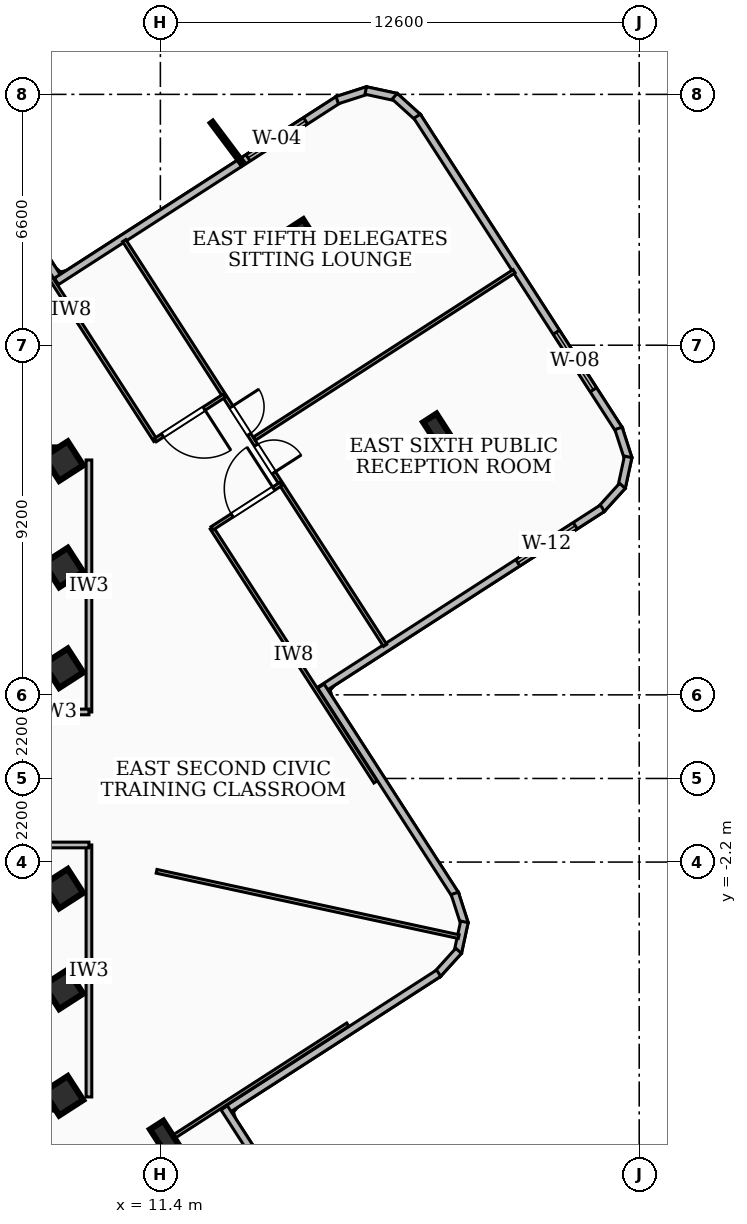
"""IFC4 building model, lengths in metres.
Left out: names, types, materials, properties, quantities, classifications, styles, units other than length and angle.
Written with IfcOpenShell. Run it as: python <this file> out.ifc"""

import sys

from ifc_helpers import new_model, si_unit, direction, frame, frame_2d, origin, origin_2d, place, context, subcontext, project, spatial, rectangle, i_section, extrude, element, fill, save


model = new_model("IFC4")
c1 = context("Model", 3, precision=1e-05, world=origin(), true_north=direction((0.0, 1.0)))
c2 = subcontext(c1, "Body", "Model", "MODEL_VIEW")
j1 = project(units=[si_unit("LENGTHUNIT", "METRE"), si_unit("PLANEANGLEUNIT", "RADIAN")], contexts=[c1])
p1 = place(None, origin())
s1 = spatial("IfcSite", under=j1, at=p1, CompositionType="ELEMENT")
p2 = place(p1, origin())
s2 = spatial("IfcBuilding", under=s1, at=p2, CompositionType="ELEMENT")
p3 = place(p2, frame((0.0, 0.0, 215.46)))
s3 = spatial("IfcBuildingStorey", under=s2, at=p3, CompositionType="ELEMENT", Elevation=215.46)
for number, where, z_axis, x_axis in (
    (1, (-8.78, 8.51, 0.0), (0.0, 0.0, 1.0), (1.0, 0.0, 0.0)),
    (2, (8.78, -8.51, 0.0), (0.0, 0.0, 1.0), (-1.0, 0.0, 0.0)),
):
    element("IfcWall", number, at=place(p3, frame(where, z_axis=z_axis, x_axis=x_axis)), inside=s3, PredefinedType="SHEAR", context=c2, shape_type="SweptSolid", body=[
        extrude(rectangle(XDim=17.56, YDim=0.4, at=frame_2d((8.78, 0.0))), origin(), (0.0, 0.0, 1.0), 3.16),
    ])
for number, where, z_axis, x_axis in (
    (3, (8.85, -5.55, 0.0), (0.0, 0.0, 1.0), (0.841, 0.542, 0.0)),
    (4, (8.85, -2.9, 0.0), (0.0, 0.0, 1.0), (0.841, 0.542, 0.0)),
    (5, (8.85, 2.9, 0.0), (0.0, 0.0, 1.0), (0.841, 0.542, 0.0)),
    (6, (8.85, 5.55, 0.0), (0.0, 0.0, 1.0), (0.841, 0.542, 0.0)),
    (7, (8.85, -8.35, 0.0), (0.0, 0.0, 1.0), (0.841, 0.542, 0.0)),
    (8, (8.85, 8.35, 0.0), (0.0, 0.0, 1.0), (0.841, 0.542, 0.0)),
):
    element("IfcColumn", number, at=place(p3, frame(where, z_axis=z_axis, x_axis=x_axis)), inside=s3, PredefinedType="COLUMN", context=c2, shape_type="SweptSolid", body=[
        extrude(rectangle(XDim=0.75, YDim=0.75, at=origin_2d()), origin(), (0.0, 0.0, 1.0), 3.42),
    ])
for number, where, z_axis, x_axis in (
    (9, (18.741, 9.097, 0.0), (0.0, 0.0, 1.0), (0.841, 0.542, 0.0)),
    (10, (15.234, 14.209, 0.0), (0.0, 0.0, 1.0), (0.841, 0.542, 0.0)),
    (11, (11.554, -9.51, 0.0), (0.0, 0.0, 1.0), (0.841, 0.542, 0.0)),
):
    element("IfcColumn", number, at=place(p3, frame(where, z_axis=z_axis, x_axis=x_axis)), inside=s3, PredefinedType="COLUMN", context=c2, shape_type="SweptSolid", body=[
        extrude(i_section(OverallWidth=0.418, OverallDepth=0.927, WebThickness=0.019, FlangeThickness=0.032, at=origin_2d()), origin(), (0.0, 0.0, 1.0), 3.42),
    ])
p4 = place(p3, frame((5.124, 18.723, 0.0), z_axis=(0.0, 0.0, 1.0), x_axis=(0.541679726821, -0.840584959151, 0.0)))
e12 = element("IfcWall", 12, at=p4, inside=s3, PredefinedType="SOLIDWALL", context=c2, shape_type="SweptSolid", body=[
    extrude(rectangle(XDim=6.742, YDim=0.2, at=frame_2d((3.371, 0.0))), origin(), (0.0, 0.0, 1.0), 3.16),
])
p5 = place(p3, frame((8.666, 13.08, 0.0), z_axis=(0.0, 0.0, 1.0), x_axis=(0.840540020681, 0.541749456515, 0.0)))
e13 = element("IfcWall", 13, at=p5, inside=s3, PredefinedType="SOLIDWALL", context=c2, shape_type="SweptSolid", body=[
    extrude(rectangle(XDim=8.842, YDim=0.2, at=frame_2d((4.421, 0.0))), origin(), (0.0, 0.0, 1.0), 3.16),
])
p6 = place(p5, frame((5.997, 0.0, 0.85)))
e14 = element("IfcOpeningElement", 14, at=p6, cuts=e13, PredefinedType="OPENING", context=c2, shape_type="SweptSolid", body=[
    extrude(rectangle(XDim=1.8, YDim=2.0, at=frame_2d((0.9, 1.0))), frame((0.0, 0.11, 0.0), z_axis=(0.0, -1.0, 0.0), x_axis=(1.0, 0.0, 0.0)), (0.0, 0.0, 1.0), 0.22),
])
p7 = place(p3, frame((16.053, 17.848, 0.0), z_axis=(0.0, 0.0, 1.0), x_axis=(0.951946820804, 0.306263367646, 0.0)))
e15 = element("IfcWall", 15, at=p7, inside=s3, PredefinedType="SOLIDWALL", context=c2, shape_type="SweptSolid", body=[
    extrude(rectangle(XDim=0.839, YDim=0.2, at=frame_2d((0.42, 0.0))), origin(), (0.0, 0.0, 1.0), 3.16),
])
p8 = place(p3, frame((16.804, 18.102, 0.0), z_axis=(0.0, 0.0, 1.0), x_axis=(0.977405889656, -0.211371064399, 0.0)))
e16 = element("IfcWall", 16, at=p8, inside=s3, PredefinedType="SOLIDWALL", context=c2, shape_type="SweptSolid", body=[
    extrude(rectangle(XDim=0.823, YDim=0.2, at=frame_2d((0.412, 0.0))), origin(), (0.0, 0.0, 1.0), 3.16),
])
p9 = place(p3, frame((17.566, 17.95, 0.0), z_axis=(0.0, 0.0, 1.0), x_axis=(0.741439258983, -0.671019988703, 0.0)))
e17 = element("IfcWall", 17, at=p9, inside=s3, PredefinedType="SOLIDWALL", context=c2, shape_type="SweptSolid", body=[
    extrude(rectangle(XDim=0.839, YDim=0.2, at=frame_2d((0.419, 0.0))), origin(), (0.0, 0.0, 1.0), 3.16),
])
p10 = place(p3, frame((18.155, 17.425, 0.0), z_axis=(0.0, 0.0, 1.0), x_axis=(0.541713039183, -0.840563491462, 0.0)))
e18 = element("IfcWall", 18, at=p10, inside=s3, PredefinedType="SOLIDWALL", context=c2, shape_type="SweptSolid", body=[
    extrude(rectangle(XDim=9.824, YDim=0.2, at=frame_2d((4.912, 0.0))), origin(), (0.0, 0.0, 1.0), 3.16),
])
p11 = place(p10, frame((6.763, 0.0, 0.85)))
e19 = element("IfcOpeningElement", 19, at=p11, cuts=e18, PredefinedType="OPENING", context=c2, shape_type="SweptSolid", body=[
    extrude(rectangle(XDim=1.8, YDim=1.8, at=frame_2d((0.9, 0.9))), frame((0.0, 0.11, 0.0), z_axis=(0.0, -1.0, 0.0), x_axis=(1.0, 0.0, 0.0)), (0.0, 0.0, 1.0), 0.22),
])
p12 = place(p3, frame((23.455, 9.212, 0.0), z_axis=(0.0, 0.0, 1.0), x_axis=(0.306424011446, -0.951895123009, 0.0)))
e20 = element("IfcWall", 20, at=p12, inside=s3, PredefinedType="SOLIDWALL", context=c2, shape_type="SweptSolid", body=[
    extrude(rectangle(XDim=0.838, YDim=0.2, at=frame_2d((0.419, 0.0))), origin(), (0.0, 0.0, 1.0), 3.16),
])
p13 = place(p3, frame((23.709, 8.462, 0.0), z_axis=(0.0, 0.0, 1.0), x_axis=(-0.210237806088, -0.977650277395, 0.0)))
e21 = element("IfcWall", 21, at=p13, inside=s3, PredefinedType="SOLIDWALL", context=c2, shape_type="SweptSolid", body=[
    extrude(rectangle(XDim=0.823, YDim=0.2, at=frame_2d((0.412, 0.0))), origin(), (0.0, 0.0, 1.0), 3.16),
])
p14 = place(p3, frame((23.558, 7.7, 0.0), z_axis=(0.0, 0.0, 1.0), x_axis=(-0.671818647766, -0.740715670493, 0.0)))
e22 = element("IfcWall", 22, at=p14, inside=s3, PredefinedType="SOLIDWALL", context=c2, shape_type="SweptSolid", body=[
    extrude(rectangle(XDim=0.84, YDim=0.2, at=frame_2d((0.42, 0.0))), origin(), (0.0, 0.0, 1.0), 3.16),
])
p15 = place(p3, frame((23.032, 7.111, 0.0), z_axis=(0.0, 0.0, 1.0), x_axis=(-0.840540020681, -0.541749456515, 0.0)))
e23 = element("IfcWall", 23, at=p15, inside=s3, PredefinedType="SOLIDWALL", context=c2, shape_type="SweptSolid", body=[
    extrude(rectangle(XDim=8.842, YDim=0.2, at=frame_2d((4.421, 0.0))), origin(), (0.0, 0.0, 1.0), 3.16),
])
p16 = place(p15, frame((0.85, 0.0, 0.85)))
e24 = element("IfcOpeningElement", 24, at=p16, cuts=e23, PredefinedType="OPENING", context=c2, shape_type="SweptSolid", body=[
    extrude(rectangle(XDim=1.8, YDim=1.6, at=frame_2d((0.9, 0.8))), frame((0.0, 0.11, 0.0), z_axis=(0.0, -1.0, 0.0), x_axis=(1.0, 0.0, 0.0)), (0.0, 0.0, 1.0), 0.22),
])
p17 = place(p3, frame((15.624, 2.431, 0.0), z_axis=(0.0, 0.0, 1.0), x_axis=(0.541715396451, -0.840561972283, 0.0)))
e25 = element("IfcWall", 25, at=p17, inside=s3, PredefinedType="SOLIDWALL", context=c2, shape_type="SweptSolid", body=[
    extrude(rectangle(XDim=6.542, YDim=0.2, at=frame_2d((3.271, 0.0))), origin(), (0.0, 0.0, 1.0), 3.16),
])
p18 = place(p3, frame((19.146, -3.023, 0.0), z_axis=(0.0, 0.0, 1.0), x_axis=(0.306602907463, -0.951837516142, 0.0)))
e26 = element("IfcWall", 26, at=p18, inside=s3, PredefinedType="SOLIDWALL", context=c2, shape_type="SweptSolid", body=[
    extrude(rectangle(XDim=0.838, YDim=0.2, at=frame_2d((0.419, 0.0))), origin(), (0.0, 0.0, 1.0), 3.16),
])
p19 = place(p3, frame((19.4, -3.773, 0.0), z_axis=(0.0, 0.0, 1.0), x_axis=(-0.211087829535, -0.977467098281, 0.0)))
e27 = element("IfcWall", 27, at=p19, inside=s3, PredefinedType="SOLIDWALL", context=c2, shape_type="SweptSolid", body=[
    extrude(rectangle(XDim=0.823, YDim=0.2, at=frame_2d((0.412, 0.0))), origin(), (0.0, 0.0, 1.0), 3.16),
])
p20 = place(p3, frame((19.248, -4.535, 0.0), z_axis=(0.0, 0.0, 1.0), x_axis=(-0.671019988703, -0.741439258983, 0.0)))
e28 = element("IfcWall", 28, at=p20, inside=s3, PredefinedType="SOLIDWALL", context=c2, shape_type="SweptSolid", body=[
    extrude(rectangle(XDim=0.839, YDim=0.2, at=frame_2d((0.419, 0.0))), origin(), (0.0, 0.0, 1.0), 3.16),
])
p21 = place(p3, frame((18.723, -5.124, 0.0), z_axis=(0.0, 0.0, 1.0), x_axis=(-0.840584959151, -0.541679726821, 0.0)))
e29 = element("IfcWall", 29, at=p21, inside=s3, PredefinedType="SOLIDWALL", context=c2, shape_type="SweptSolid", body=[
    extrude(rectangle(XDim=6.742, YDim=0.2, at=frame_2d((3.371, 0.0))), origin(), (0.0, 0.0, 1.0), 3.16),
])
p22 = place(p3, frame((13.08, -8.666, 0.0), z_axis=(0.0, 0.0, 1.0), x_axis=(0.541732711374, -0.840550813114, 0.0)))
e30 = element("IfcWall", 30, at=p22, inside=s3, PredefinedType="SOLIDWALL", context=c2, shape_type="SweptSolid", body=[
    extrude(rectangle(XDim=4.642, YDim=0.2, at=frame_2d((2.321, 0.0))), origin(), (0.0, 0.0, 1.0), 3.16),
])
p23 = place(p3, frame((9.52, 1.75, 0.0), z_axis=(0.0, 0.0, 1.0), x_axis=(0.0, 1.0, 0.0)))
e31 = element("IfcWall", 31, at=p23, inside=s3, PredefinedType="PARTITIONING", context=c2, shape_type="SweptSolid", body=[
    extrude(rectangle(XDim=6.63, YDim=0.15, at=frame_2d((3.315, 0.0))), origin(), (0.0, 0.0, 1.0), 2.53),
])
p24 = place(p3, frame((7.85, 1.75, 0.0), z_axis=(0.0, 0.0, 1.0), x_axis=(1.0, 0.0, 0.0)))
e32 = element("IfcWall", 32, at=p24, inside=s3, PredefinedType="PARTITIONING", context=c2, shape_type="SweptSolid", body=[
    extrude(rectangle(XDim=1.67, YDim=0.15, at=frame_2d((0.835, 0.0))), origin(), (0.0, 0.0, 1.0), 2.39),
])
p25 = place(p3, frame((9.52, -8.38, 0.0), z_axis=(0.0, 0.0, 1.0), x_axis=(0.0, 1.0, 0.0)))
e33 = element("IfcWall", 33, at=p25, inside=s3, PredefinedType="PARTITIONING", context=c2, shape_type="SweptSolid", body=[
    extrude(rectangle(XDim=6.63, YDim=0.15, at=frame_2d((3.315, 0.0))), origin(), (0.0, 0.0, 1.0), 3.16),
])
p26 = place(p3, frame((7.85, -1.75, 0.0), z_axis=(0.0, 0.0, 1.0), x_axis=(1.0, 0.0, 0.0)))
e34 = element("IfcWall", 34, at=p26, inside=s3, PredefinedType="PARTITIONING", context=c2, shape_type="SweptSolid", body=[
    extrude(rectangle(XDim=1.67, YDim=0.15, at=frame_2d((0.835, 0.0))), origin(), (0.0, 0.0, 1.0), 2.39),
])
p27 = place(p3, frame((11.3, -2.443, 0.0), z_axis=(0.0, 0.0, 1.0), x_axis=(0.977411986974, -0.211342867681, 0.0)))
e35 = element("IfcWall", 35, at=p27, inside=s3, PredefinedType="PARTITIONING", context=c2, shape_type="SweptSolid", body=[
    extrude(rectangle(XDim=8.134, YDim=0.1, at=frame_2d((4.067, 0.0))), origin(), (0.0, 0.0, 1.0), 3.16),
])
p28 = place(p3, frame((11.27, 8.893, 0.0), z_axis=(0.0, 0.0, 1.0), x_axis=(-0.541761070726, 0.840532534912, 0.0)))
e36 = element("IfcWall", 36, at=p28, inside=s3, PredefinedType="PARTITIONING", context=c2, shape_type="SweptSolid", body=[
    extrude(rectangle(XDim=8.149, YDim=0.1, at=frame_2d((4.075, 0.0))), origin(), (0.0, 0.0, 1.0), 2.53),
])
p29 = place(p3, frame((17.06, -0.093, 0.0), z_axis=(0.0, 0.0, 1.0), x_axis=(-0.541691689426, 0.840577250232, 0.0)))
e37 = element("IfcWall", 37, at=p29, inside=s3, PredefinedType="PARTITIONING", context=c2, shape_type="SweptSolid", body=[
    extrude(rectangle(XDim=7.949, YDim=0.1, at=frame_2d((3.975, 0.0))), origin(), (0.0, 0.0, 1.0), 3.16),
])
p30 = place(p3, frame((13.08, 10.071, 0.0), z_axis=(0.0, 0.0, 1.0), x_axis=(-0.840623628822, -0.541619714067, 0.0)))
e38 = element("IfcWall", 38, at=p30, inside=s3, PredefinedType="PARTITIONING", context=c2, shape_type="SweptSolid", body=[
    extrude(rectangle(XDim=2.16, YDim=0.1, at=frame_2d((1.08, 0.0))), origin(), (0.0, 0.0, 1.0), 3.16),
])
p31 = place(p30, frame((0.63, 0.0, 0.0)))
e39 = element("IfcOpeningElement", 39, at=p31, cuts=e38, PredefinedType="OPENING", context=c2, shape_type="SweptSolid", body=[
    extrude(rectangle(XDim=1.3, YDim=2.1, at=frame_2d((0.65, 1.05))), frame((0.0, 0.06, 0.0), z_axis=(0.0, -1.0, 0.0), x_axis=(1.0, 0.0, 0.0)), (0.0, 0.0, 1.0), 0.12),
])
p32 = place(p3, frame((12.759, 6.581, 0.0), z_axis=(0.0, 0.0, 1.0), x_axis=(0.840641931508, 0.541591306236, 0.0)))
e40 = element("IfcWall", 40, at=p32, inside=s3, PredefinedType="PARTITIONING", context=c2, shape_type="SweptSolid", body=[
    extrude(rectangle(XDim=2.16, YDim=0.1, at=frame_2d((1.08, 0.0))), origin(), (0.0, 0.0, 1.0), 3.16),
])
p33 = place(p32, frame((0.63, 0.0, 0.0)))
e41 = element("IfcOpeningElement", 41, at=p33, cuts=e40, PredefinedType="OPENING", context=c2, shape_type="SweptSolid", body=[
    extrude(rectangle(XDim=1.3, YDim=2.1, at=frame_2d((0.65, 1.05))), frame((0.0, 0.06, 0.0), z_axis=(0.0, -1.0, 0.0), x_axis=(1.0, 0.0, 0.0)), (0.0, 0.0, 1.0), 0.12),
])
p34 = place(p3, frame((13.878, 8.944, 0.0), z_axis=(0.0, 0.0, 1.0), x_axis=(0.840576508336, 0.541692840671, 0.0)))
e42 = element("IfcWall", 42, at=p34, inside=s3, PredefinedType="PARTITIONING", context=c2, shape_type="SweptSolid", body=[
    extrude(rectangle(XDim=8.124, YDim=0.1, at=frame_2d((4.062, 0.0))), origin(), (0.0, 0.0, 1.0), 2.689),
])
p35 = place(p3, frame((10.449, 14.152, 0.0), z_axis=(0.0, 0.0, 1.0), x_axis=(0.541734007753, -0.8405499776, 0.0)))
e43 = element("IfcWall", 43, at=p35, inside=s3, PredefinedType="PARTITIONING", context=c2, shape_type="SweptSolid", body=[
    extrude(rectangle(XDim=12.67, YDim=0.1, at=frame_2d((6.335, 0.0))), origin(), (0.0, 0.0, 1.0), 2.53),
])
p36 = place(p35, frame((6.405, 0.0, 0.0)))
e44 = element("IfcOpeningElement", 44, at=p36, cuts=e43, PredefinedType="OPENING", context=c2, shape_type="SweptSolid", body=[
    extrude(rectangle(XDim=0.86, YDim=2.04, at=frame_2d((0.43, 1.02))), frame((0.0, 0.06, 0.0), z_axis=(0.0, -1.0, 0.0), x_axis=(1.0, 0.0, 0.0)), (0.0, 0.0, 1.0), 0.12),
])
p37 = place(p35, frame((5.205, 0.0, 0.0)))
e45 = element("IfcOpeningElement", 45, at=p37, cuts=e43, PredefinedType="OPENING", context=c2, shape_type="SweptSolid", body=[
    extrude(rectangle(XDim=0.86, YDim=2.04, at=frame_2d((0.43, 1.02))), frame((0.0, 0.06, 0.0), z_axis=(0.0, -1.0, 0.0), x_axis=(1.0, 0.0, 0.0)), (0.0, 0.0, 1.0), 0.12),
])
p38 = place(p3, frame((16.331, -6.476, 0.0), z_axis=(0.0, 0.0, 1.0), x_axis=(-0.840579457381, -0.541688264437, 0.0)))
e46 = element("IfcWall", 46, at=p38, inside=s3, PredefinedType="PARTITIONING", context=c2, shape_type="SweptSolid", body=[
    extrude(rectangle(XDim=20.238, YDim=0.1, at=frame_2d((10.119, 0.0))), origin(), (0.0, 0.0, 1.0), 2.53),
])
p39 = place(p38, frame((9.619, 0.0, 0.0)))
e47 = element("IfcOpeningElement", 47, at=p39, cuts=e46, PredefinedType="OPENING", context=c2, shape_type="SweptSolid", body=[
    extrude(rectangle(XDim=1.2, YDim=2.1, at=frame_2d((0.6, 1.05))), frame((0.0, 0.06, 0.0), z_axis=(0.0, -1.0, 0.0), x_axis=(1.0, 0.0, 0.0)), (0.0, 0.0, 1.0), 0.12),
])
p40 = place(p6, origin())
e48 = element("IfcWindow", 48, at=p40, inside=s3, PartitioningType="SINGLE_PANEL", PredefinedType="WINDOW", context=c2, shape_type="SweptSolid", body=[
    extrude(rectangle(XDim=1.8, YDim=2.0, at=frame_2d((0.9, 1.0))), frame((0.0, 0.03, 0.0), z_axis=(0.0, -1.0, 0.0), x_axis=(1.0, 0.0, 0.0)), (0.0, 0.0, 1.0), 0.06),
])
fill(e14, e48)
p41 = place(p11, origin())
e49 = element("IfcWindow", 49, at=p41, inside=s3, PartitioningType="SINGLE_PANEL", PredefinedType="WINDOW", context=c2, shape_type="SweptSolid", body=[
    extrude(rectangle(XDim=1.8, YDim=1.8, at=frame_2d((0.9, 0.9))), frame((0.0, 0.03, 0.0), z_axis=(0.0, -1.0, 0.0), x_axis=(1.0, 0.0, 0.0)), (0.0, 0.0, 1.0), 0.06),
])
fill(e19, e49)
p42 = place(p16, origin())
e50 = element("IfcWindow", 50, at=p42, inside=s3, PartitioningType="SINGLE_PANEL", PredefinedType="WINDOW", context=c2, shape_type="SweptSolid", body=[
    extrude(rectangle(XDim=1.8, YDim=1.6, at=frame_2d((0.9, 0.8))), frame((0.0, 0.03, 0.0), z_axis=(0.0, -1.0, 0.0), x_axis=(1.0, 0.0, 0.0)), (0.0, 0.0, 1.0), 0.06),
])
fill(e24, e50)
p43 = place(p31, origin())
e51 = element("IfcDoor", 51, at=p43, inside=s3, OperationType="SINGLE_SWING_LEFT", PredefinedType="DOOR", context=c2, shape_type="SweptSolid", body=[
    extrude(rectangle(XDim=1.3, YDim=2.1, at=frame_2d((0.65, 1.05))), frame((0.0, 0.025, 0.0), z_axis=(0.0, -1.0, 0.0), x_axis=(1.0, 0.0, 0.0)), (0.0, 0.0, 1.0), 0.05),
])
fill(e39, e51)
p44 = place(p33, origin())
e52 = element("IfcDoor", 52, at=p44, inside=s3, OperationType="SINGLE_SWING_RIGHT", PredefinedType="DOOR", context=c2, shape_type="SweptSolid", body=[
    extrude(rectangle(XDim=1.3, YDim=2.1, at=frame_2d((0.65, 1.05))), frame((0.0, 0.025, 0.0), z_axis=(0.0, -1.0, 0.0), x_axis=(1.0, 0.0, 0.0)), (0.0, 0.0, 1.0), 0.05),
])
fill(e41, e52)
p45 = place(p36, origin())
e53 = element("IfcDoor", 53, at=p45, inside=s3, OperationType="SINGLE_SWING_RIGHT", PredefinedType="DOOR", context=c2, shape_type="SweptSolid", body=[
    extrude(rectangle(XDim=0.86, YDim=2.04, at=frame_2d((0.43, 1.02))), frame((0.0, 0.025, 0.0), z_axis=(0.0, -1.0, 0.0), x_axis=(1.0, 0.0, 0.0)), (0.0, 0.0, 1.0), 0.05),
])
fill(e44, e53)
p46 = place(p37, origin())
e54 = element("IfcDoor", 54, at=p46, inside=s3, OperationType="SINGLE_SWING_LEFT", PredefinedType="DOOR", context=c2, shape_type="SweptSolid", body=[
    extrude(rectangle(XDim=0.86, YDim=2.04, at=frame_2d((0.43, 1.02))), frame((0.0, 0.025, 0.0), z_axis=(0.0, -1.0, 0.0), x_axis=(1.0, 0.0, 0.0)), (0.0, 0.0, 1.0), 0.05),
])
fill(e45, e54)
save(model, sys.argv[1])
